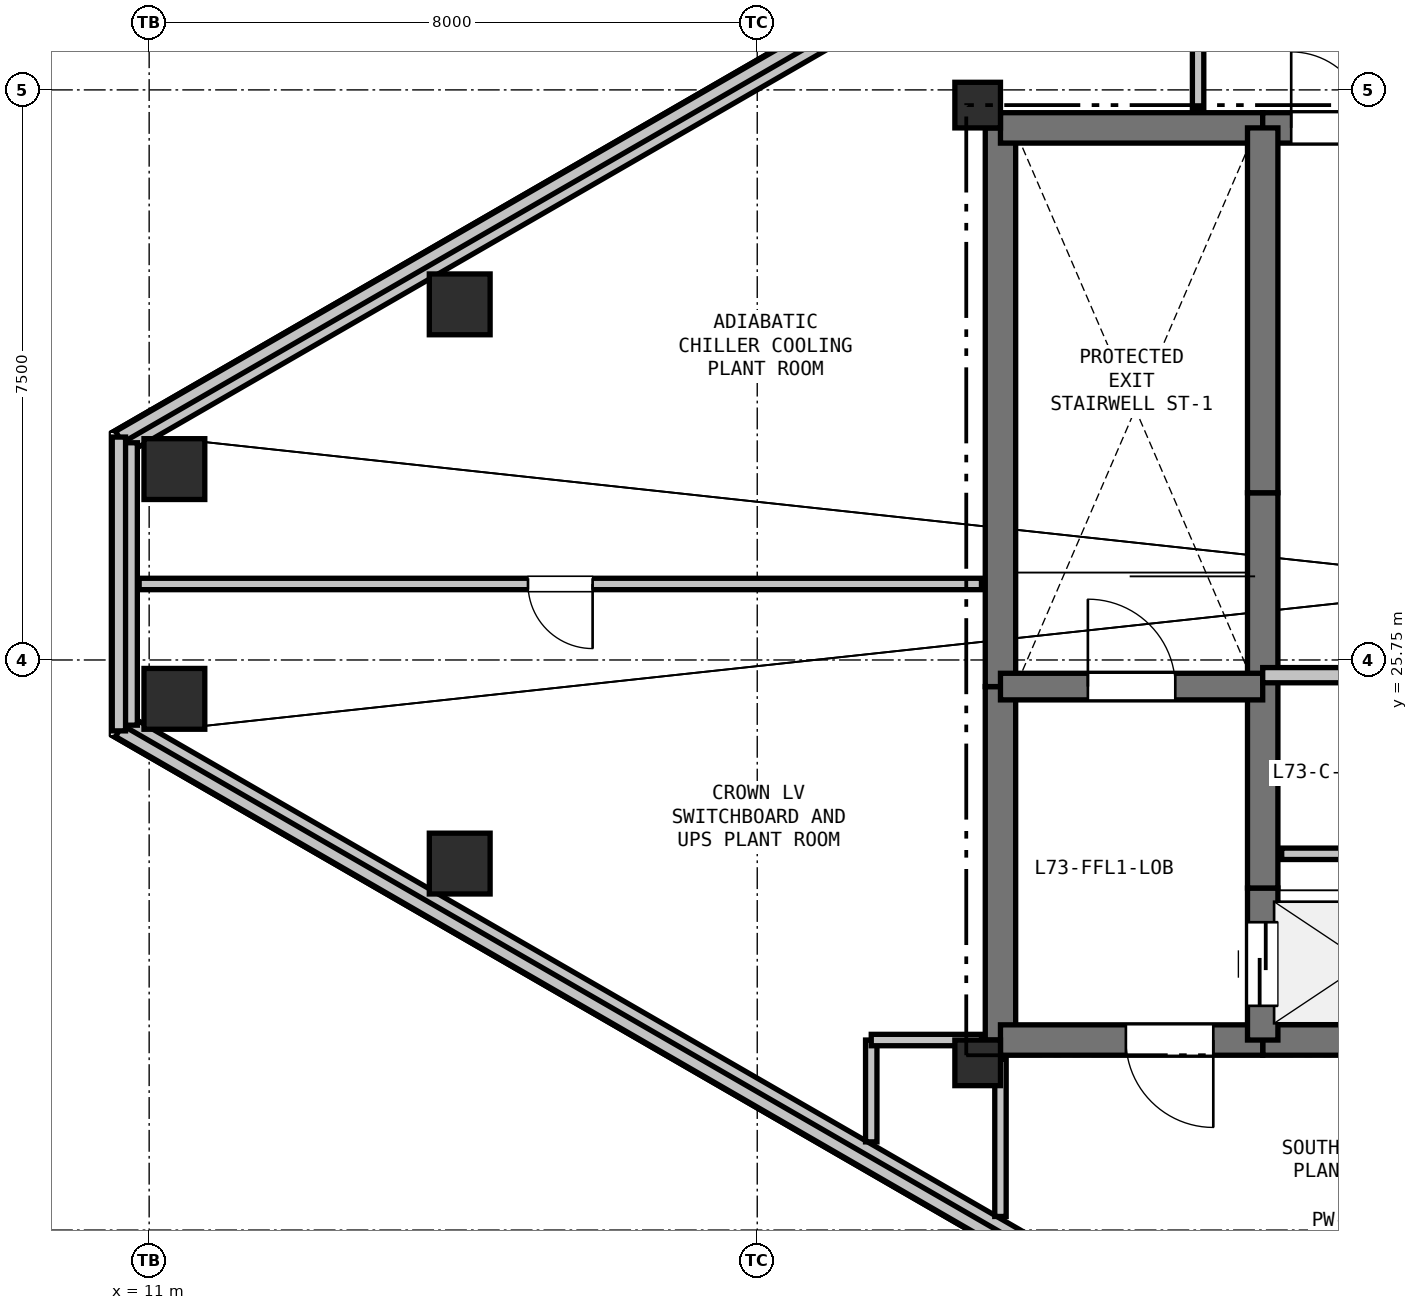
"""IFC4 building model, lengths in metres.
Left out: names, types, materials, properties, quantities, classifications, styles, units other than length and angle.
Written with IfcOpenShell. Run it as: python <this file> out.ifc"""

import sys

from ifc_helpers import new_model, si_unit, direction, frame, frame_2d, origin, origin_2d, place, context, subcontext, project, spatial, rectangle, hollow_rectangle, extrude, element, fill, save


model = new_model("IFC4")
c1 = context("Model", 3, precision=1e-05, world=origin(), true_north=direction((0.0, 1.0)))
c2 = subcontext(c1, "Body", "Model", "MODEL_VIEW")
j1 = project(units=[si_unit("LENGTHUNIT", "METRE"), si_unit("PLANEANGLEUNIT", "RADIAN")], contexts=[c1])
p1 = place(None, origin())
s1 = spatial("IfcSite", under=j1, at=p1, CompositionType="ELEMENT")
p2 = place(p1, origin())
s2 = spatial("IfcBuilding", under=s1, at=p2, CompositionType="ELEMENT")
p3 = place(p2, frame((0.0, 0.0, 264.0)))
s3 = spatial("IfcBuildingStorey", under=s2, at=p3, CompositionType="ELEMENT", Elevation=264.0)
for number, where, z_axis, x_axis in (
    (1, (21.9, 20.45, 0.0), (0.0, 0.0, 1.0), (1.0, 0.0, 0.0)),
    (2, (21.9, 33.05, 0.0), (0.0, 0.0, 1.0), (1.0, 0.0, 0.0)),
):
    element("IfcColumn", number, at=place(p3, frame(where, z_axis=z_axis, x_axis=x_axis)), inside=s3, PredefinedType="COLUMN", context=c2, shape_type="SweptSolid", body=[
        extrude(rectangle(XDim=0.6, YDim=0.6, at=origin_2d()), origin(), (0.0, 0.0, 1.0), 2.6),
    ])
for number, where, z_axis, x_axis in (
    (3, (11.332, 28.261, 0.0), (0.0, 0.0, 1.0), (1.0, 0.0, 0.0)),
    (4, (15.086, 30.428, 0.0), (0.0, 0.0, 1.0), (1.0, 0.0, 0.0)),
    (5, (15.086, 23.072, 0.0), (0.0, 0.0, 1.0), (1.0, 0.0, 0.0)),
    (6, (11.332, 25.239, 0.0), (0.0, 0.0, 1.0), (1.0, 0.0, 0.0)),
):
    element("IfcColumn", number, at=place(p3, frame(where, z_axis=z_axis, x_axis=x_axis)), inside=s3, PredefinedType="COLUMN", context=c2, shape_type="SweptSolid", body=[
        extrude(hollow_rectangle(XDim=0.8, YDim=0.8, WallThickness=0.025, at=origin_2d()), origin(), (0.0, 0.0, 1.0), 2.6),
    ])
p4 = place(p3, frame((10.732, 28.608, 0.0), z_axis=(0.0, 0.0, 1.0), x_axis=(0.866023553042, 0.500003205566, 0.0)))
e7 = element("IfcWall", 7, at=p4, inside=s3, PredefinedType="SOLIDWALL", context=c2, shape_type="SweptSolid", body=[
    extrude(rectangle(XDim=29.783, YDim=0.225, at=frame_2d((14.892, 0.0))), origin(), (0.0, 0.0, 1.0), 2.25),
])
p5 = place(p3, frame((10.602, 28.683, 2.7), z_axis=(0.0, 0.0, 1.0), x_axis=(0.866024093284, 0.500002269847, 0.0)))
e8 = element("IfcWall", 8, at=p5, inside=s3, PredefinedType="PARAPET", context=c2, shape_type="SweptSolid", body=[
    extrude(rectangle(XDim=29.933, YDim=0.175, at=frame_2d((14.967, 0.0))), origin(), (0.0, 0.0, 1.0), 1.2),
])
p6 = place(p3, frame((36.525, 10.0, 0.0), z_axis=(0.0, 0.0, 1.0), x_axis=(-0.866023553042, 0.500003205566, 0.0)))
e9 = element("IfcWall", 9, at=p6, inside=s3, PredefinedType="SOLIDWALL", context=c2, shape_type="SweptSolid", body=[
    extrude(rectangle(XDim=29.783, YDim=0.225, at=frame_2d((14.892, 0.0))), origin(), (0.0, 0.0, 1.0), 2.25),
])
p7 = place(p3, frame((36.525, 9.851, 2.7), z_axis=(0.0, 0.0, 1.0), x_axis=(-0.866024093284, 0.500002269847, 0.0)))
e10 = element("IfcWall", 10, at=p7, inside=s3, PredefinedType="PARAPET", context=c2, shape_type="SweptSolid", body=[
    extrude(rectangle(XDim=29.933, YDim=0.175, at=frame_2d((14.967, 0.0))), origin(), (0.0, 0.0, 1.0), 1.2),
])
p8 = place(p3, frame((10.732, 24.892, 0.0), z_axis=(0.0, 0.0, 1.0), x_axis=(0.0, 1.0, 0.0)))
e11 = element("IfcWall", 11, at=p8, inside=s3, PredefinedType="SOLIDWALL", context=c2, shape_type="SweptSolid", body=[
    extrude(rectangle(XDim=3.715, YDim=0.225, at=frame_2d((1.858, 0.0))), origin(), (0.0, 0.0, 1.0), 2.25),
])
p9 = place(p3, frame((10.602, 24.817, 2.7), z_axis=(0.0, 0.0, 1.0), x_axis=(0.0, 1.0, 0.0)))
e12 = element("IfcWall", 12, at=p9, inside=s3, PredefinedType="PARAPET", context=c2, shape_type="SweptSolid", body=[
    extrude(rectangle(XDim=3.865, YDim=0.175, at=frame_2d((1.933, 0.0))), origin(), (0.0, 0.0, 1.0), 1.2),
])
p10 = place(p3, frame((22.2, 20.75, 0.0), z_axis=(0.0, 0.0, 1.0), x_axis=(0.0, 1.0, 0.0)))
e13 = element("IfcWall", 13, at=p10, inside=s3, PredefinedType="SHEAR", context=c2, shape_type="SweptSolid", body=[
    extrude(rectangle(XDim=4.65, YDim=0.4, at=frame_2d((2.325, 0.0))), origin(), (0.0, 0.0, 1.0), 2.6),
])
p11 = place(p3, frame((22.2, 25.4, 0.0), z_axis=(0.0, 0.0, 1.0), x_axis=(0.0, 1.0, 0.0)))
e14 = element("IfcWall", 14, at=p11, inside=s3, PredefinedType="SHEAR", context=c2, shape_type="SweptSolid", body=[
    extrude(rectangle(XDim=7.35, YDim=0.4, at=frame_2d((3.675, 0.0))), origin(), (0.0, 0.0, 1.0), 2.6),
])
p12 = place(p3, frame((22.2, 32.75, 0.0), z_axis=(0.0, 0.0, 1.0), x_axis=(1.0, 0.0, 0.0)))
e15 = element("IfcWall", 15, at=p12, inside=s3, PredefinedType="SHEAR", context=c2, shape_type="SweptSolid", body=[
    extrude(rectangle(XDim=3.45, YDim=0.4, at=frame_2d((1.725, 0.0))), origin(), (0.0, 0.0, 1.0), 2.6),
])
p13 = place(p3, frame((25.65, 32.75, 0.0), z_axis=(0.0, 0.0, 1.0), x_axis=(1.0, 0.0, 0.0)))
e16 = element("IfcWall", 16, at=p13, inside=s3, PredefinedType="SHEAR", context=c2, shape_type="SweptSolid", body=[
    extrude(rectangle(XDim=1.75, YDim=0.4, at=frame_2d((0.875, 0.0))), origin(), (0.0, 0.0, 1.0), 2.6),
])
p14 = place(p13, frame((0.375, 0.0, 0.0)))
e17 = element("IfcOpeningElement", 17, at=p14, cuts=e16, PredefinedType="OPENING", context=c2, shape_type="SweptSolid", body=[
    extrude(rectangle(XDim=1.0, YDim=2.15, at=frame_2d((0.5, 1.075))), frame((0.0, 0.21, 0.0), z_axis=(0.0, -1.0, 0.0), x_axis=(1.0, 0.0, 0.0)), (0.0, 0.0, 1.0), 0.42),
])
p15 = place(p3, frame((28.35, 20.75, 0.0), z_axis=(0.0, 0.0, 1.0), x_axis=(-1.0, 0.0, 0.0)))
e18 = element("IfcWall", 18, at=p15, inside=s3, PredefinedType="SHEAR", context=c2, shape_type="SweptSolid", body=[
    extrude(rectangle(XDim=2.7, YDim=0.4, at=frame_2d((1.35, 0.0))), origin(), (0.0, 0.0, 1.0), 2.6),
])
p16 = place(p3, frame((25.65, 20.75, 0.0), z_axis=(0.0, 0.0, 1.0), x_axis=(-1.0, 0.0, 0.0)))
e19 = element("IfcWall", 19, at=p16, inside=s3, PredefinedType="SHEAR", context=c2, shape_type="SweptSolid", body=[
    extrude(rectangle(XDim=3.45, YDim=0.4, at=frame_2d((1.725, 0.0))), origin(), (0.0, 0.0, 1.0), 2.6),
])
p17 = place(p16, frame((0.65, 0.0, 0.0)))
e20 = element("IfcOpeningElement", 20, at=p17, cuts=e19, PredefinedType="OPENING", context=c2, shape_type="SweptSolid", body=[
    extrude(rectangle(XDim=1.15, YDim=2.15, at=frame_2d((0.575, 1.075))), frame((0.0, 0.21, 0.0), z_axis=(0.0, -1.0, 0.0), x_axis=(1.0, 0.0, 0.0)), (0.0, 0.0, 1.0), 0.42),
])
p18 = place(p3, frame((25.65, 20.75, 0.0), z_axis=(0.0, 0.0, 1.0), x_axis=(0.0, 1.0, 0.0)))
e21 = element("IfcWall", 21, at=p18, inside=s3, PredefinedType="SHEAR", context=c2, shape_type="SweptSolid", body=[
    extrude(rectangle(XDim=2.0, YDim=0.4, at=frame_2d((1.0, 0.0))), origin(), (0.0, 0.0, 1.0), 2.6),
])
p19 = place(p18, frame((0.45, 0.0, 0.0)))
e22 = element("IfcOpeningElement", 22, at=p19, cuts=e21, PredefinedType="OPENING", context=c2, shape_type="SweptSolid", body=[
    extrude(rectangle(XDim=1.1, YDim=2.15, at=frame_2d((0.55, 1.075))), frame((0.0, 0.21, 0.0), z_axis=(0.0, -1.0, 0.0), x_axis=(1.0, 0.0, 0.0)), (0.0, 0.0, 1.0), 0.42),
])
p20 = place(p3, frame((25.65, 22.75, 0.0), z_axis=(0.0, 0.0, 1.0), x_axis=(0.0, 1.0, 0.0)))
e23 = element("IfcWall", 23, at=p20, inside=s3, PredefinedType="SHEAR", context=c2, shape_type="SweptSolid", body=[
    extrude(rectangle(XDim=2.8, YDim=0.4, at=frame_2d((1.4, 0.0))), origin(), (0.0, 0.0, 1.0), 2.6),
])
p21 = place(p3, frame((25.65, 25.55, 0.0), z_axis=(0.0, 0.0, 1.0), x_axis=(0.0, 1.0, 0.0)))
e24 = element("IfcWall", 24, at=p21, inside=s3, PredefinedType="SHEAR", context=c2, shape_type="SweptSolid", body=[
    extrude(rectangle(XDim=2.4, YDim=0.4, at=frame_2d((1.2, 0.0))), origin(), (0.0, 0.0, 1.0), 2.6),
])
p22 = place(p3, frame((25.65, 27.95, 0.0), z_axis=(0.0, 0.0, 1.0), x_axis=(0.0, 1.0, 0.0)))
e25 = element("IfcWall", 25, at=p22, inside=s3, PredefinedType="SHEAR", context=c2, shape_type="SweptSolid", body=[
    extrude(rectangle(XDim=4.8, YDim=0.4, at=frame_2d((2.4, 0.0))), origin(), (0.0, 0.0, 1.0), 2.6),
])
p23 = place(p3, frame((22.2, 25.4, 0.0), z_axis=(0.0, 0.0, 1.0), x_axis=(1.0, 0.0, 0.0)))
e26 = element("IfcWall", 26, at=p23, inside=s3, PredefinedType="SHEAR", context=c2, shape_type="SweptSolid", body=[
    extrude(rectangle(XDim=3.45, YDim=0.35, at=frame_2d((1.725, 0.0))), origin(), (0.0, 0.0, 1.0), 2.6),
])
p24 = place(p23, frame((1.15, 0.0, 0.0)))
e27 = element("IfcOpeningElement", 27, at=p24, cuts=e26, PredefinedType="OPENING", context=c2, shape_type="SweptSolid", body=[
    extrude(rectangle(XDim=1.15, YDim=2.15, at=frame_2d((0.575, 1.075))), frame((0.0, 0.185, 0.0), z_axis=(0.0, -1.0, 0.0), x_axis=(1.0, 0.0, 0.0)), (0.0, 0.0, 1.0), 0.37),
])
p25 = place(p3, frame((25.65, 25.55, 0.0), z_axis=(0.0, 0.0, 1.0), x_axis=(1.0, 0.0, 0.0)))
e28 = element("IfcWall", 28, at=p25, inside=s3, PredefinedType="PARTITIONING", context=c2, shape_type="SweptSolid", body=[
    extrude(rectangle(XDim=4.95, YDim=0.2, at=frame_2d((2.475, 0.0))), origin(), (0.0, 0.0, 1.0), 2.6),
])
p26 = place(p25, frame((2.0, 0.0, 0.0)))
e29 = element("IfcOpeningElement", 29, at=p26, cuts=e28, PredefinedType="OPENING", context=c2, shape_type="SweptSolid", body=[
    extrude(rectangle(XDim=0.85, YDim=2.1, at=frame_2d((0.425, 1.05))), frame((0.0, 0.11, 0.0), z_axis=(0.0, -1.0, 0.0), x_axis=(1.0, 0.0, 0.0)), (0.0, 0.0, 1.0), 0.22),
])
p27 = place(p3, frame((25.9, 23.2, 0.0), z_axis=(0.0, 0.0, 1.0), x_axis=(1.0, 0.0, 0.0)))
e30 = element("IfcWall", 30, at=p27, inside=s3, PredefinedType="PARTITIONING", context=c2, shape_type="SweptSolid", body=[
    extrude(rectangle(XDim=2.45, YDim=0.15, at=frame_2d((1.225, 0.0))), origin(), (0.0, 0.0, 1.0), 2.6),
])
p28 = place(p3, frame((24.8, 33.0, 0.0), z_axis=(0.0, 0.0, 1.0), x_axis=(0.0, 1.0, 0.0)))
e31 = element("IfcWall", 31, at=p28, inside=s3, PredefinedType="PARTITIONING", context=c2, shape_type="SweptSolid", body=[
    extrude(rectangle(XDim=2.55, YDim=0.15, at=frame_2d((1.275, 0.0))), origin(), (0.0, 0.0, 1.0), 2.6),
])
p29 = place(p3, frame((22.2, 18.429, 0.0), z_axis=(0.0, 0.0, 1.0), x_axis=(0.0, 1.0, 0.0)))
e32 = element("IfcWall", 32, at=p29, inside=s3, PredefinedType="PARTITIONING", context=c2, shape_type="SweptSolid", body=[
    extrude(rectangle(XDim=2.071, YDim=0.15, at=frame_2d((1.036, 0.0))), origin(), (0.0, 0.0, 1.0), 2.105),
])
p30 = place(p3, frame((21.95, 26.75, 0.0), z_axis=(0.0, 0.0, 1.0), x_axis=(-1.0, 0.0, 0.0)))
e33 = element("IfcWall", 33, at=p30, inside=s3, PredefinedType="PARTITIONING", context=c2, shape_type="SweptSolid", body=[
    extrude(rectangle(XDim=11.082, YDim=0.15, at=frame_2d((5.541, 0.0))), origin(), (0.0, 0.0, 1.0), 2.105),
])
p31 = place(p30, frame((5.116, 0.0, 0.0)))
e34 = element("IfcOpeningElement", 34, at=p31, cuts=e33, PredefinedType="OPENING", context=c2, shape_type="SweptSolid", body=[
    extrude(rectangle(XDim=0.85, YDim=2.09, at=frame_2d((0.425, 1.045))), frame((0.0, 0.085, 0.0), z_axis=(0.0, -1.0, 0.0), x_axis=(1.0, 0.0, 0.0)), (0.0, 0.0, 1.0), 0.17),
])
p32 = place(p3, frame((20.5, 20.75, 0.0), z_axis=(0.0, 0.0, 1.0), x_axis=(0.0, -1.0, 0.0)))
e35 = element("IfcWall", 35, at=p32, inside=s3, PredefinedType="PARTITIONING", context=c2, shape_type="SweptSolid", body=[
    extrude(rectangle(XDim=1.34, YDim=0.15, at=frame_2d((0.67, 0.0))), origin(), (0.0, 0.0, 1.0), 2.105),
])
p33 = place(p3, frame((21.95, 20.75, 0.0), z_axis=(0.0, 0.0, 1.0), x_axis=(-1.0, 0.0, 0.0)))
e36 = element("IfcWall", 36, at=p33, inside=s3, PredefinedType="PARTITIONING", context=c2, shape_type="SweptSolid", body=[
    extrude(rectangle(XDim=1.45, YDim=0.15, at=frame_2d((0.725, 0.0))), origin(), (0.0, 0.0, 1.0), 2.6),
])
p34 = place(p14, origin())
e37 = element("IfcDoor", 37, at=p34, inside=s3, OperationType="SINGLE_SWING_LEFT", PredefinedType="DOOR", context=c2, shape_type="SweptSolid", body=[
    extrude(rectangle(XDim=1.0, YDim=2.15, at=frame_2d((0.5, 1.075))), frame((0.0, 0.025, 0.0), z_axis=(0.0, -1.0, 0.0), x_axis=(1.0, 0.0, 0.0)), (0.0, 0.0, 1.0), 0.05),
])
fill(e17, e37)
p35 = place(p19, origin())
e38 = element("IfcDoor", 38, at=p35, inside=s3, OperationType="SLIDING_TO_LEFT", PredefinedType="DOOR", context=c2, shape_type="SweptSolid", body=[
    extrude(rectangle(XDim=1.1, YDim=2.15, at=frame_2d((0.55, 1.075))), frame((0.0, 0.025, 0.0), z_axis=(0.0, -1.0, 0.0), x_axis=(1.0, 0.0, 0.0)), (0.0, 0.0, 1.0), 0.05),
])
fill(e22, e38)
p36 = place(p24, origin())
e39 = element("IfcDoor", 39, at=p36, inside=s3, OperationType="SINGLE_SWING_LEFT", PredefinedType="DOOR", context=c2, shape_type="SweptSolid", body=[
    extrude(rectangle(XDim=1.15, YDim=2.15, at=frame_2d((0.575, 1.075))), frame((0.0, 0.025, 0.0), z_axis=(0.0, -1.0, 0.0), x_axis=(1.0, 0.0, 0.0)), (0.0, 0.0, 1.0), 0.05),
])
fill(e27, e39)
p37 = place(p17, origin())
e40 = element("IfcDoor", 40, at=p37, inside=s3, OperationType="SINGLE_SWING_LEFT", PredefinedType="DOOR", context=c2, shape_type="SweptSolid", body=[
    extrude(rectangle(XDim=1.15, YDim=2.15, at=frame_2d((0.575, 1.075))), frame((0.0, 0.025, 0.0), z_axis=(0.0, -1.0, 0.0), x_axis=(1.0, 0.0, 0.0)), (0.0, 0.0, 1.0), 0.05),
])
fill(e20, e40)
p38 = place(p31, origin())
e41 = element("IfcDoor", 41, at=p38, inside=s3, OperationType="SINGLE_SWING_LEFT", PredefinedType="DOOR", context=c2, shape_type="SweptSolid", body=[
    extrude(rectangle(XDim=0.85, YDim=2.09, at=frame_2d((0.425, 1.045))), frame((0.0, 0.025, 0.0), z_axis=(0.0, -1.0, 0.0), x_axis=(1.0, 0.0, 0.0)), (0.0, 0.0, 1.0), 0.05),
])
fill(e34, e41)
save(model, sys.argv[1])
